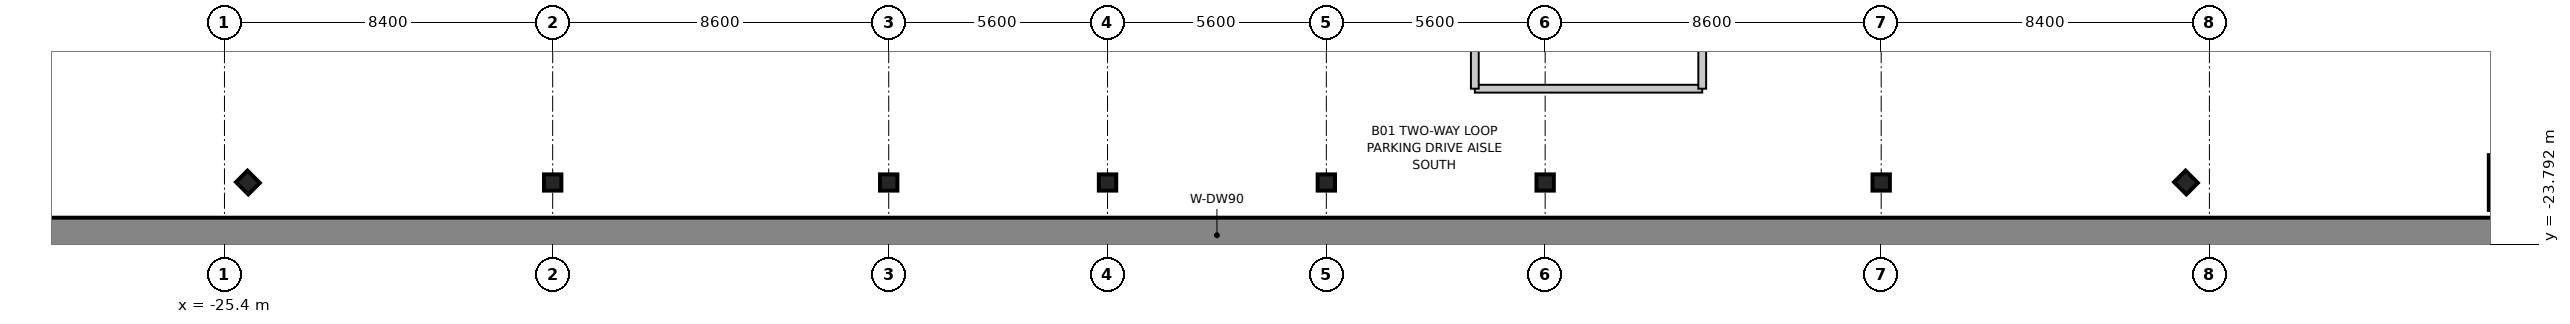
"""IFC4 building model, lengths in metres.
Left out: names, types, materials, properties, quantities, classifications, styles, units other than length and angle.
Written with IfcOpenShell. Run it as: python <this file> out.ifc"""

import sys

from ifc_helpers import new_model, si_unit, direction, frame, frame_2d, origin, origin_2d, place, context, subcontext, project, spatial, rectangle, i_section, extrude, source, transform, mapped, element, save


model = new_model("IFC4")
c1 = context("Model", 3, precision=1e-05, world=origin(), true_north=direction((0.0, 1.0)))
c2 = subcontext(c1, "Body", "Model", "MODEL_VIEW")
j1 = project(units=[si_unit("LENGTHUNIT", "METRE"), si_unit("PLANEANGLEUNIT", "RADIAN")], contexts=[c1])
p1 = place(None, origin())
s1 = spatial("IfcSite", under=j1, at=p1, CompositionType="ELEMENT")
p2 = place(p1, origin())
s2 = spatial("IfcBuilding", under=s1, at=p2, CompositionType="ELEMENT")
p3 = place(p2, frame((0.0, 0.0, -5.4)))
s3 = spatial("IfcBuildingStorey", under=s2, at=p3, CompositionType="ELEMENT", Elevation=-5.4)
m1 = source(origin(), c2, "Body", "SweptSolid", [
    extrude(rectangle(XDim=76.0, YDim=0.9, at=frame_2d((38.0, 0.0))), origin(), (0.0, 0.0, 1.0), 4.98),
])
p4 = place(p3, frame((-38.0, -23.55, 0.0), z_axis=(0.0, 0.0, 1.0), x_axis=(1.0, 0.0, 0.0)))
e1 = element("IfcWall", 1, at=p4, inside=s3, PredefinedType="SHEAR", context=c2, shape_type="MappedRepresentation", body=[
    mapped(m1, transform((0.0, 0.0, 0.0), scale=1.0)),
])
m2 = source(origin(), c2, "Body", "SweptSolid", [
    extrude(rectangle(XDim=0.9, YDim=1.4, at=origin_2d()), origin(), (0.0, 0.0, 1.0), 5.355),
])
p5 = place(p3, frame((33.0, -22.2, 0.0), z_axis=(0.0, 0.0, 1.0), x_axis=(1.0, 0.0, 0.0)))
e2 = element("IfcColumn", 2, at=p5, inside=s3, PredefinedType="PILASTER", context=c2, shape_type="MappedRepresentation", body=[
    mapped(m2, transform((0.0, 0.0, 0.0), scale=1.0)),
])
m3 = source(origin(), c2, "Body", "SweptSolid", [
    extrude(i_section(OverallWidth=0.416, OverallDepth=0.446, WebThickness=0.025, FlangeThickness=0.04, at=origin_2d()), origin(), (0.0, 0.0, 1.0), 5.355),
])
for number, where, z_axis, x_axis in (
    (3, (-17.0, -22.2, 0.0), (0.0, 0.0, 1.0), (0.0, 1.0, 0.0)),
    (4, (-8.4, -22.2, 0.0), (0.0, 0.0, 1.0), (0.0, 1.0, 0.0)),
    (5, (-2.8, -22.2, 0.0), (0.0, 0.0, 1.0), (0.0, 1.0, 0.0)),
    (6, (2.8, -22.2, 0.0), (0.0, 0.0, 1.0), (0.0, 1.0, 0.0)),
    (7, (8.4, -22.2, 0.0), (0.0, 0.0, 1.0), (0.0, 1.0, 0.0)),
    (8, (17.0, -22.2, 0.0), (0.0, 0.0, 1.0), (0.0, 1.0, 0.0)),
    (9, (-24.8, -22.2, 0.0), (0.0, 0.0, 1.0), (0.707, 0.707, 0.0)),
    (10, (24.8, -22.2, 0.0), (0.0, 0.0, 1.0), (0.707, 0.707, 0.0)),
):
    element("IfcColumn", number, at=place(p3, frame(where, z_axis=z_axis, x_axis=x_axis)), inside=s3, PredefinedType="COLUMN", context=c2, shape_type="MappedRepresentation", body=[
        mapped(m3, transform((0.0, 0.0, 0.0), scale=1.0)),
    ])
m4 = source(origin(), c2, "Body", "SweptSolid", [
    extrude(rectangle(XDim=5.82, YDim=0.2, at=frame_2d((2.91, 0.0))), origin(), (0.0, 0.0, 1.0), 3.4),
])
p6 = place(p3, frame((6.6, -19.8, 0.0), z_axis=(0.0, 0.0, 1.0), x_axis=(1.0, 0.0, 0.0)))
e11 = element("IfcWall", 11, at=p6, inside=s3, PredefinedType="PARTITIONING", context=c2, shape_type="MappedRepresentation", body=[
    mapped(m4, transform((0.0, 0.0, 0.0), scale=1.0)),
])
m5 = source(origin(), c2, "Body", "SweptSolid", [
    extrude(rectangle(XDim=4.03, YDim=0.2, at=frame_2d((2.015, 0.0))), origin(), (0.0, 0.0, 1.0), 3.4),
])
p7 = place(p3, frame((6.6, -19.8, 0.0), z_axis=(0.0, 0.0, 1.0), x_axis=(0.0, 1.0, 0.0)))
e12 = element("IfcWall", 12, at=p7, inside=s3, PredefinedType="PARTITIONING", context=c2, shape_type="MappedRepresentation", body=[
    mapped(m5, transform((0.0, 0.0, 0.0), scale=1.0)),
])
m6 = source(origin(), c2, "Body", "SweptSolid", [
    extrude(rectangle(XDim=5.1, YDim=0.2, at=frame_2d((2.55, 0.0))), origin(), (0.0, 0.0, 1.0), 3.4),
])
p8 = place(p3, frame((12.42, -19.8, 0.0), z_axis=(0.0, 0.0, 1.0), x_axis=(0.0, 1.0, 0.0)))
e13 = element("IfcWall", 13, at=p8, inside=s3, PredefinedType="PARTITIONING", context=c2, shape_type="MappedRepresentation", body=[
    mapped(m6, transform((0.0, 0.0, 0.0), scale=1.0)),
])
save(model, sys.argv[1])
